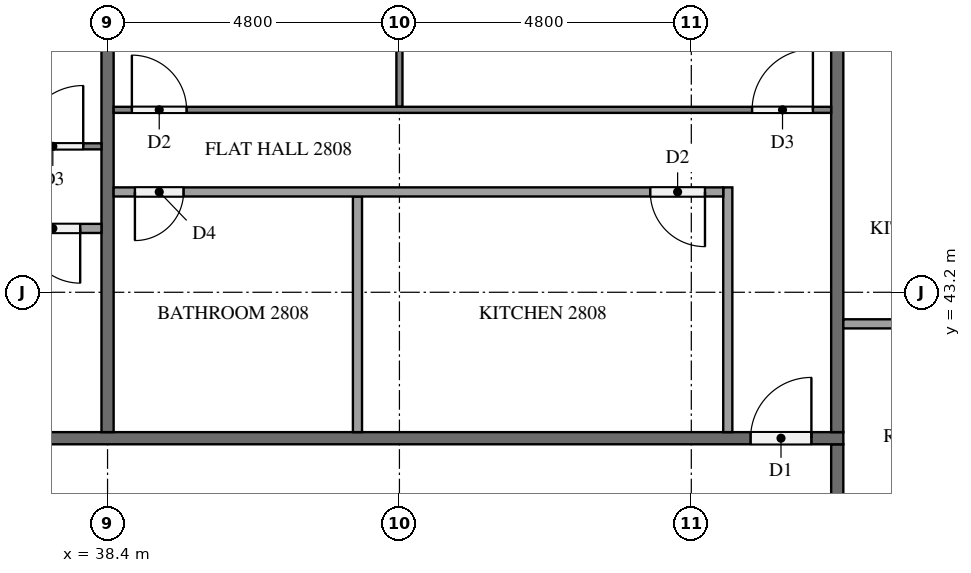
"""IFC4 building model, lengths in metres.
Left out: names, types, materials, properties, quantities, classifications, styles, units other than length and angle.
Written with IfcOpenShell. Run it as: python <this file> out.ifc"""

import sys

from ifc_helpers import new_model, si_unit, direction, frame, frame_2d, origin, place, context, subcontext, project, spatial, rectangle, extrude, element, fill, save


model = new_model("IFC4")
c1 = context("Model", 3, precision=1e-05, world=origin(), true_north=direction((0.0, 1.0)))
c2 = subcontext(c1, "Body", "Model", "MODEL_VIEW")
j1 = project(units=[si_unit("LENGTHUNIT", "METRE"), si_unit("PLANEANGLEUNIT", "RADIAN")], contexts=[c1])
p1 = place(None, origin())
s1 = spatial("IfcSite", under=j1, at=p1, CompositionType="ELEMENT")
p2 = place(p1, origin())
s2 = spatial("IfcBuilding", under=s1, at=p2, CompositionType="ELEMENT")
p3 = place(p2, frame((0.0, 0.0, 110.2)))
s3 = spatial("IfcBuildingStorey", under=s2, at=p3, CompositionType="ELEMENT", Elevation=110.2)
p4 = place(p3, frame((50.4, 40.7, 0.0), z_axis=(0.0, 0.0, 1.0), x_axis=(0.0, -1.0, 0.0)))
e1 = element("IfcWall", 1, at=p4, inside=s3, PredefinedType="PARTITIONING", context=c2, shape_type="SweptSolid", body=[
    extrude(rectangle(XDim=2.8, YDim=0.2, at=frame_2d((1.4, 0.0))), origin(), (0.0, 0.0, 1.0), 3.1),
])
p5 = place(p4, frame((1.475, 0.0, 0.0)))
e2 = element("IfcOpeningElement", 2, at=p5, cuts=e1, PredefinedType="OPENING", context=c2, shape_type="SweptSolid", body=[
    extrude(rectangle(XDim=1.0, YDim=2.1, at=frame_2d((0.5, 1.05))), frame((0.0, 0.11, 0.0), z_axis=(0.0, -1.0, 0.0), x_axis=(1.0, 0.0, 0.0)), (0.0, 0.0, 1.0), 0.22),
])
p6 = place(p3, frame((11.9, 40.8, 0.0), z_axis=(0.0, 0.0, 1.0), x_axis=(1.0, 0.0, 0.0)))
e3 = element("IfcWall", 3, at=p6, inside=s3, PredefinedType="PARTITIONING", context=c2, shape_type="SweptSolid", body=[
    extrude(rectangle(XDim=38.6, YDim=0.2, at=frame_2d((19.3, 0.0))), origin(), (0.0, 0.0, 1.0), 3.1),
])
p7 = place(p6, frame((37.075, 0.0, 0.0)))
e4 = element("IfcOpeningElement", 4, at=p7, cuts=e3, PredefinedType="OPENING", context=c2, shape_type="SweptSolid", body=[
    extrude(rectangle(XDim=1.0, YDim=2.1, at=frame_2d((0.5, 1.05))), frame((0.0, 0.11, 0.0), z_axis=(0.0, -1.0, 0.0), x_axis=(1.0, 0.0, 0.0)), (0.0, 0.0, 1.0), 0.22),
])
p8 = place(p6, frame((14.925, 0.0, 0.0)))
e5 = element("IfcOpeningElement", 5, at=p8, cuts=e3, PredefinedType="OPENING", context=c2, shape_type="SweptSolid", body=[
    extrude(rectangle(XDim=1.0, YDim=2.1, at=frame_2d((0.5, 1.05))), frame((0.0, 0.11, 0.0), z_axis=(0.0, -1.0, 0.0), x_axis=(1.0, 0.0, 0.0)), (0.0, 0.0, 1.0), 0.22),
])
p9 = place(p6, frame((0.525, 0.0, 0.0)))
e6 = element("IfcOpeningElement", 6, at=p9, cuts=e3, PredefinedType="OPENING", context=c2, shape_type="SweptSolid", body=[
    extrude(rectangle(XDim=1.0, YDim=2.1, at=frame_2d((0.5, 1.05))), frame((0.0, 0.11, 0.0), z_axis=(0.0, -1.0, 0.0), x_axis=(1.0, 0.0, 0.0)), (0.0, 0.0, 1.0), 0.22),
])
p10 = place(p3, frame((50.4, 40.9, 0.0), z_axis=(0.0, 0.0, 1.0), x_axis=(0.0, 1.0, 0.0)))
e7 = element("IfcWall", 7, at=p10, inside=s3, PredefinedType="PARTITIONING", context=c2, shape_type="SweptSolid", body=[
    extrude(rectangle(XDim=11.8, YDim=0.2, at=frame_2d((5.9, 0.0))), origin(), (0.0, 0.0, 1.0), 3.1),
])
p11 = place(p3, frame((38.4, 52.375, 0.0), z_axis=(0.0, 0.0, 1.0), x_axis=(0.0, -1.0, 0.0)))
e8 = element("IfcWall", 8, at=p11, inside=s3, PredefinedType="PARTITIONING", context=c2, shape_type="SweptSolid", body=[
    extrude(rectangle(XDim=11.475, YDim=0.2, at=frame_2d((5.738, 0.0))), origin(), (0.0, 0.0, 1.0), 3.1),
])
p12 = place(p3, frame((50.5, 42.681, 0.0), z_axis=(0.0, 0.0, 1.0), x_axis=(1.0, 0.0, 0.0)))
e9 = element("IfcWall", 9, at=p12, inside=s3, PredefinedType="PARTITIONING", context=c2, shape_type="SweptSolid", body=[
    extrude(rectangle(XDim=2.975, YDim=0.15, at=frame_2d((1.488, 0.0))), origin(), (0.0, 0.0, 1.0), 3.1),
])
p13 = place(p3, frame((43.2, 46.25, 0.0), z_axis=(0.0, 0.0, 1.0), x_axis=(0.0, 1.0, 0.0)))
e10 = element("IfcWall", 10, at=p13, inside=s3, PredefinedType="PARTITIONING", context=c2, shape_type="SweptSolid", body=[
    extrude(rectangle(XDim=6.45, YDim=0.1, at=frame_2d((3.225, 0.0))), origin(), (0.0, 0.0, 1.0), 3.1),
])
p14 = place(p3, frame((38.5, 46.2, 0.0), z_axis=(0.0, 0.0, 1.0), x_axis=(1.0, 0.0, 0.0)))
e11 = element("IfcWall", 11, at=p14, inside=s3, PredefinedType="PARTITIONING", context=c2, shape_type="SweptSolid", body=[
    extrude(rectangle(XDim=11.8, YDim=0.1, at=frame_2d((5.9, 0.0))), origin(), (0.0, 0.0, 1.0), 3.1),
])
p15 = place(p14, frame((10.5, 0.0, 0.0)))
e12 = element("IfcOpeningElement", 12, at=p15, cuts=e11, PredefinedType="OPENING", context=c2, shape_type="SweptSolid", body=[
    extrude(rectangle(XDim=1.0, YDim=2.1, at=frame_2d((0.5, 1.05))), frame((0.0, 0.06, 0.0), z_axis=(0.0, -1.0, 0.0), x_axis=(1.0, 0.0, 0.0)), (0.0, 0.0, 1.0), 0.12),
])
p16 = place(p14, frame((0.3, 0.0, 0.0)))
e13 = element("IfcOpeningElement", 13, at=p16, cuts=e11, PredefinedType="OPENING", context=c2, shape_type="SweptSolid", body=[
    extrude(rectangle(XDim=0.9, YDim=2.1, at=frame_2d((0.45, 1.05))), frame((0.0, 0.06, 0.0), z_axis=(0.0, -1.0, 0.0), x_axis=(1.0, 0.0, 0.0)), (0.0, 0.0, 1.0), 0.12),
])
p17 = place(p3, frame((42.51, 40.9, 0.0), z_axis=(0.0, 0.0, 1.0), x_axis=(0.0, 1.0, 0.0)))
e14 = element("IfcWall", 14, at=p17, inside=s3, PredefinedType="PARTITIONING", context=c2, shape_type="SweptSolid", body=[
    extrude(rectangle(XDim=3.875, YDim=0.15, at=frame_2d((1.938, 0.0))), origin(), (0.0, 0.0, 1.0), 3.1),
])
p18 = place(p3, frame((48.6, 40.9, 0.0), z_axis=(0.0, 0.0, 1.0), x_axis=(0.0, 1.0, 0.0)))
e15 = element("IfcWall", 15, at=p18, inside=s3, PredefinedType="PARTITIONING", context=c2, shape_type="SweptSolid", body=[
    extrude(rectangle(XDim=4.025, YDim=0.15, at=frame_2d((2.013, 0.0))), origin(), (0.0, 0.0, 1.0), 3.1),
])
p19 = place(p3, frame((48.525, 44.85, 0.0), z_axis=(0.0, 0.0, 1.0), x_axis=(-1.0, 0.0, 0.0)))
e16 = element("IfcWall", 16, at=p19, inside=s3, PredefinedType="PARTITIONING", context=c2, shape_type="SweptSolid", body=[
    extrude(rectangle(XDim=10.025, YDim=0.15, at=frame_2d((5.012, 0.0))), origin(), (0.0, 0.0, 1.0), 3.1),
])
p20 = place(p19, frame((0.3, 0.0, 0.0)))
e17 = element("IfcOpeningElement", 17, at=p20, cuts=e16, PredefinedType="OPENING", context=c2, shape_type="SweptSolid", body=[
    extrude(rectangle(XDim=0.9, YDim=2.1, at=frame_2d((0.45, 1.05))), frame((0.0, 0.085, 0.0), z_axis=(0.0, -1.0, 0.0), x_axis=(1.0, 0.0, 0.0)), (0.0, 0.0, 1.0), 0.17),
])
p21 = place(p19, frame((8.875, 0.0, 0.0)))
e18 = element("IfcOpeningElement", 18, at=p21, cuts=e16, PredefinedType="OPENING", context=c2, shape_type="SweptSolid", body=[
    extrude(rectangle(XDim=0.8, YDim=2.1, at=frame_2d((0.4, 1.05))), frame((0.0, 0.085, 0.0), z_axis=(0.0, -1.0, 0.0), x_axis=(1.0, 0.0, 0.0)), (0.0, 0.0, 1.0), 0.17),
])
p22 = place(p3, frame((26.5, 45.6, 0.0), z_axis=(0.0, 0.0, 1.0), x_axis=(1.0, 0.0, 0.0)))
e19 = element("IfcWall", 19, at=p22, inside=s3, PredefinedType="PARTITIONING", context=c2, shape_type="SweptSolid", body=[
    extrude(rectangle(XDim=11.8, YDim=0.1, at=frame_2d((5.9, 0.0))), origin(), (0.0, 0.0, 1.0), 3.1),
])
p23 = place(p22, frame((0.3, 0.0, 0.0)))
e20 = element("IfcOpeningElement", 20, at=p23, cuts=e19, PredefinedType="OPENING", context=c2, shape_type="SweptSolid", body=[
    extrude(rectangle(XDim=0.9, YDim=2.1, at=frame_2d((0.45, 1.05))), frame((0.0, 0.06, 0.0), z_axis=(0.0, -1.0, 0.0), x_axis=(1.0, 0.0, 0.0)), (0.0, 0.0, 1.0), 0.12),
])
p24 = place(p22, frame((10.5, 0.0, 0.0)))
e21 = element("IfcOpeningElement", 21, at=p24, cuts=e19, PredefinedType="OPENING", context=c2, shape_type="SweptSolid", body=[
    extrude(rectangle(XDim=1.0, YDim=2.1, at=frame_2d((0.5, 1.05))), frame((0.0, 0.06, 0.0), z_axis=(0.0, -1.0, 0.0), x_axis=(1.0, 0.0, 0.0)), (0.0, 0.0, 1.0), 0.12),
])
p25 = place(p3, frame((38.3, 44.25, 0.0), z_axis=(0.0, 0.0, 1.0), x_axis=(-1.0, 0.0, 0.0)))
e22 = element("IfcWall", 22, at=p25, inside=s3, PredefinedType="PARTITIONING", context=c2, shape_type="SweptSolid", body=[
    extrude(rectangle(XDim=10.025, YDim=0.15, at=frame_2d((5.013, 0.0))), origin(), (0.0, 0.0, 1.0), 3.1),
])
p26 = place(p25, frame((8.925, 0.0, 0.0)))
e23 = element("IfcOpeningElement", 23, at=p26, cuts=e22, PredefinedType="OPENING", context=c2, shape_type="SweptSolid", body=[
    extrude(rectangle(XDim=0.8, YDim=2.1, at=frame_2d((0.4, 1.05))), frame((0.0, 0.085, 0.0), z_axis=(0.0, -1.0, 0.0), x_axis=(1.0, 0.0, 0.0)), (0.0, 0.0, 1.0), 0.17),
])
p27 = place(p25, frame((0.35, 0.0, 0.0)))
e24 = element("IfcOpeningElement", 24, at=p27, cuts=e22, PredefinedType="OPENING", context=c2, shape_type="SweptSolid", body=[
    extrude(rectangle(XDim=0.9, YDim=2.1, at=frame_2d((0.45, 1.05))), frame((0.0, 0.085, 0.0), z_axis=(0.0, -1.0, 0.0), x_axis=(1.0, 0.0, 0.0)), (0.0, 0.0, 1.0), 0.17),
])
p28 = place(p7, origin())
e25 = element("IfcDoor", 25, at=p28, inside=s3, OperationType="SINGLE_SWING_RIGHT", PredefinedType="DOOR", context=c2, shape_type="SweptSolid", body=[
    extrude(rectangle(XDim=1.0, YDim=2.1, at=frame_2d((0.5, 1.05))), frame((0.0, 0.025, 0.0), z_axis=(0.0, -1.0, 0.0), x_axis=(1.0, 0.0, 0.0)), (0.0, 0.0, 1.0), 0.05),
])
fill(e4, e25)
p29 = place(p15, origin())
e26 = element("IfcDoor", 26, at=p29, inside=s3, OperationType="SINGLE_SWING_RIGHT", PredefinedType="DOOR", context=c2, shape_type="SweptSolid", body=[
    extrude(rectangle(XDim=1.0, YDim=2.1, at=frame_2d((0.5, 1.05))), frame((0.0, 0.025, 0.0), z_axis=(0.0, -1.0, 0.0), x_axis=(1.0, 0.0, 0.0)), (0.0, 0.0, 1.0), 0.05),
])
fill(e12, e26)
p30 = place(p16, origin())
e27 = element("IfcDoor", 27, at=p30, inside=s3, OperationType="SINGLE_SWING_LEFT", PredefinedType="DOOR", context=c2, shape_type="SweptSolid", body=[
    extrude(rectangle(XDim=0.9, YDim=2.1, at=frame_2d((0.45, 1.05))), frame((0.0, 0.025, 0.0), z_axis=(0.0, -1.0, 0.0), x_axis=(1.0, 0.0, 0.0)), (0.0, 0.0, 1.0), 0.05),
])
fill(e13, e27)
p31 = place(p20, origin())
e28 = element("IfcDoor", 28, at=p31, inside=s3, OperationType="SINGLE_SWING_LEFT", PredefinedType="DOOR", context=c2, shape_type="SweptSolid", body=[
    extrude(rectangle(XDim=0.9, YDim=2.1, at=frame_2d((0.45, 1.05))), frame((0.0, 0.025, 0.0), z_axis=(0.0, -1.0, 0.0), x_axis=(1.0, 0.0, 0.0)), (0.0, 0.0, 1.0), 0.05),
])
fill(e17, e28)
p32 = place(p21, origin())
e29 = element("IfcDoor", 29, at=p32, inside=s3, OperationType="SINGLE_SWING_RIGHT", PredefinedType="DOOR", context=c2, shape_type="SweptSolid", body=[
    extrude(rectangle(XDim=0.8, YDim=2.1, at=frame_2d((0.4, 1.05))), frame((0.0, 0.025, 0.0), z_axis=(0.0, -1.0, 0.0), x_axis=(1.0, 0.0, 0.0)), (0.0, 0.0, 1.0), 0.05),
])
fill(e18, e29)
p33 = place(p24, origin())
e30 = element("IfcDoor", 30, at=p33, inside=s3, OperationType="SINGLE_SWING_RIGHT", PredefinedType="DOOR", context=c2, shape_type="SweptSolid", body=[
    extrude(rectangle(XDim=1.0, YDim=2.1, at=frame_2d((0.5, 1.05))), frame((0.0, 0.025, 0.0), z_axis=(0.0, -1.0, 0.0), x_axis=(1.0, 0.0, 0.0)), (0.0, 0.0, 1.0), 0.05),
])
fill(e21, e30)
p34 = place(p27, origin())
e31 = element("IfcDoor", 31, at=p34, inside=s3, OperationType="SINGLE_SWING_LEFT", PredefinedType="DOOR", context=c2, shape_type="SweptSolid", body=[
    extrude(rectangle(XDim=0.9, YDim=2.1, at=frame_2d((0.45, 1.05))), frame((0.0, 0.025, 0.0), z_axis=(0.0, -1.0, 0.0), x_axis=(1.0, 0.0, 0.0)), (0.0, 0.0, 1.0), 0.05),
])
fill(e24, e31)
save(model, sys.argv[1])
